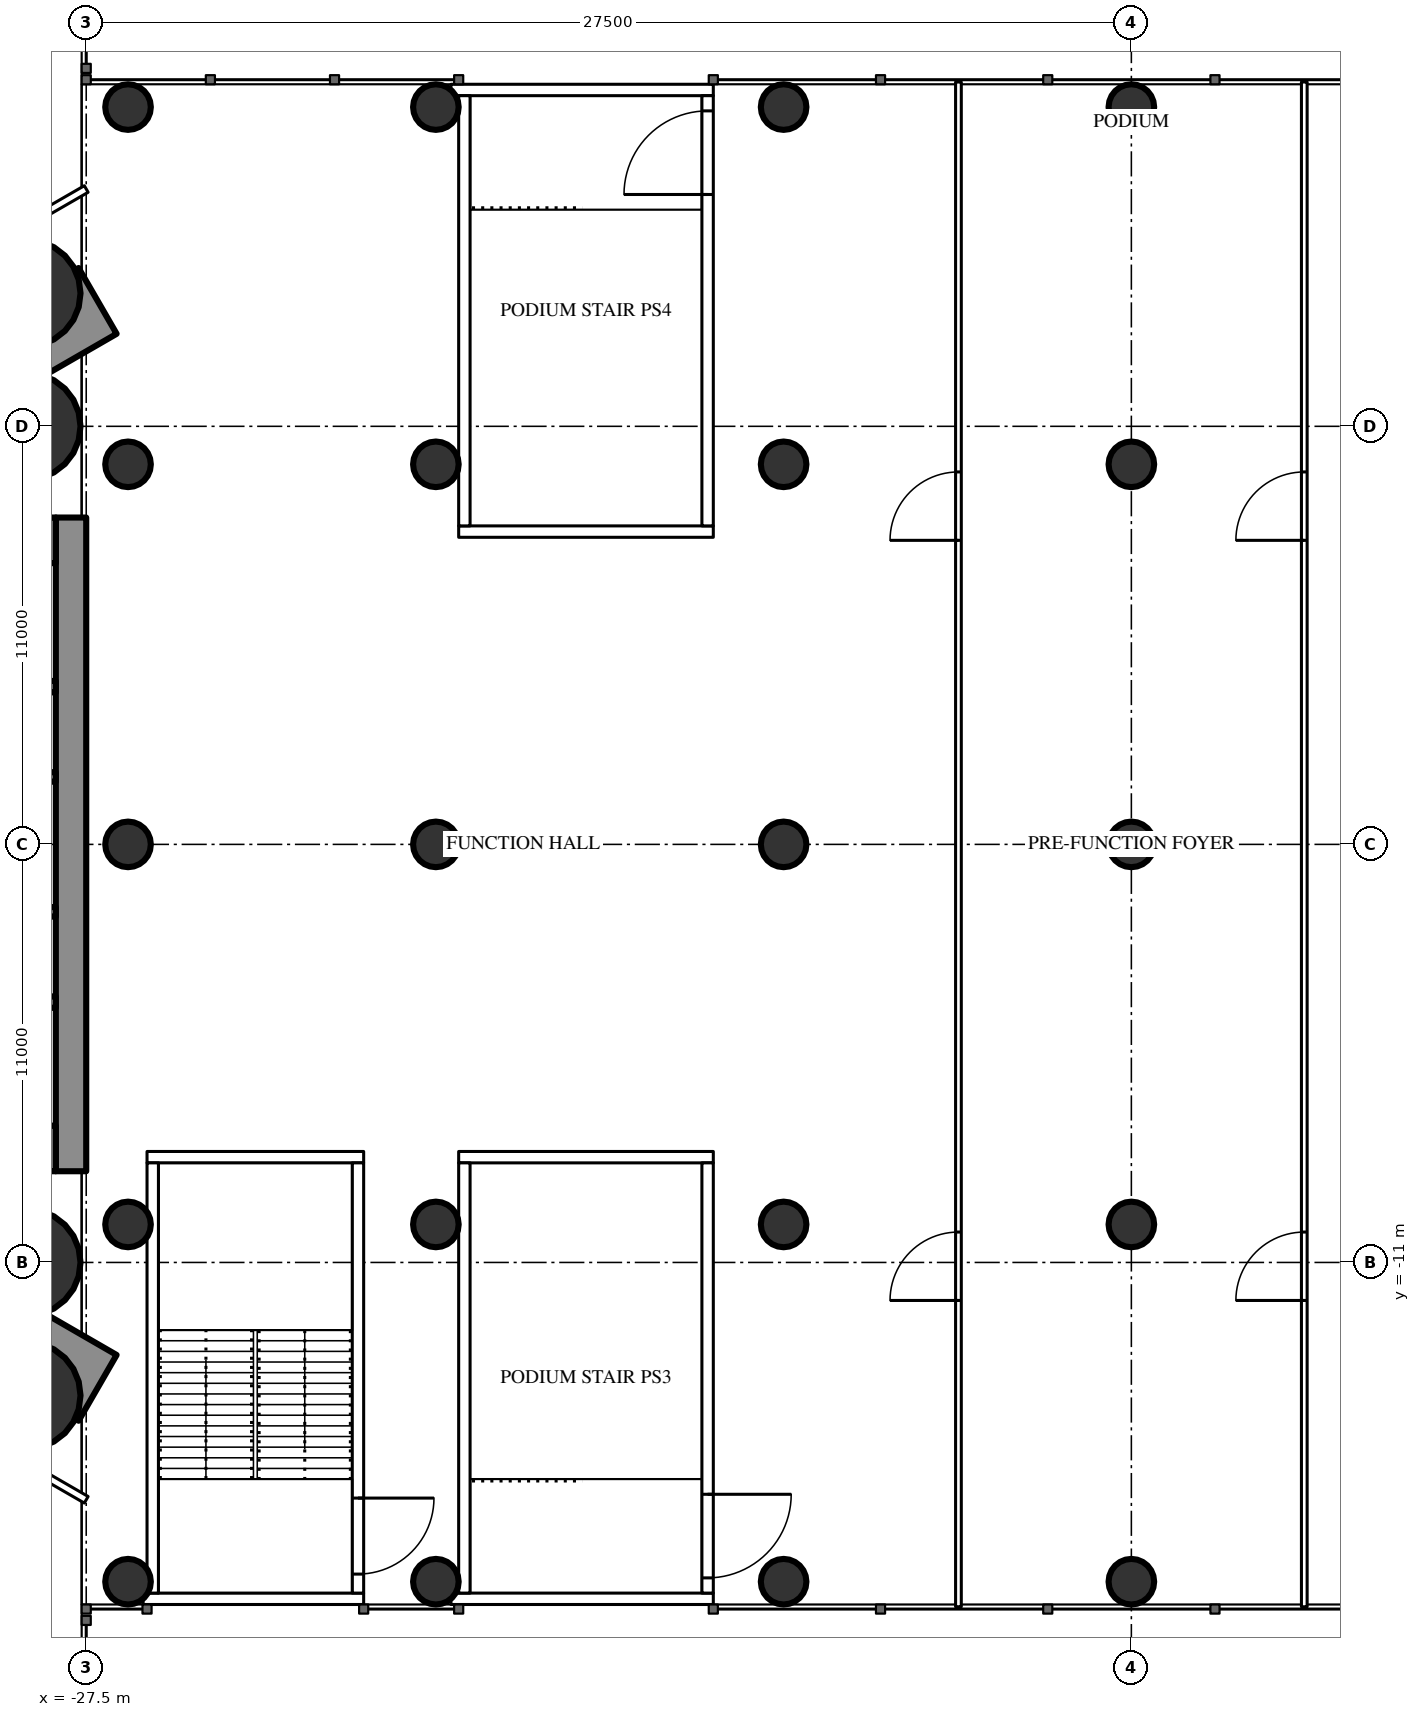
"""IFC4 building model, lengths in metres.
Left out: names, types, materials, properties, quantities, classifications, styles, units other than length and angle.
Written with IfcOpenShell. Run it as: python <this file> out.ifc"""

import sys

from ifc_helpers import new_model, si_unit, direction, frame, frame_2d, origin, origin_2d, place, context, subcontext, project, spatial, rectangle, circle, hollow_circle, extrude, element, fill, save


model = new_model("IFC4")
c1 = context("Model", 3, precision=1e-05, world=origin(), true_north=direction((0.0, 1.0)))
c2 = subcontext(c1, "Body", "Model", "MODEL_VIEW")
j1 = project(units=[si_unit("LENGTHUNIT", "METRE"), si_unit("PLANEANGLEUNIT", "RADIAN")], contexts=[c1])
p1 = place(None, origin())
s1 = spatial("IfcSite", under=j1, at=p1, CompositionType="ELEMENT")
p2 = place(p1, origin())
s2 = spatial("IfcBuilding", under=s1, at=p2, CompositionType="ELEMENT")
p3 = place(p2, frame((0.0, 0.0, 7.2)))
s3 = spatial("IfcBuildingStorey", under=s2, at=p3, CompositionType="ELEMENT", Elevation=7.2)
for number, where, z_axis, x_axis in (
    (1, (-29.05, -11.0, 0.0), (0.0, 0.0, 1.0), (1.0, 0.0, 0.0)),
    (2, (-29.05, 11.0, 0.0), (0.0, 0.0, 1.0), (1.0, 0.0, 0.0)),
    (3, (-29.05, 14.5, 0.0), (0.0, 0.0, 1.0), (1.0, 0.0, 0.0)),
    (4, (-29.05, -14.5, 0.0), (0.0, 0.0, 1.0), (1.0, 0.0, 0.0)),
):
    element("IfcColumn", number, at=place(p3, frame(where, z_axis=z_axis, x_axis=x_axis)), inside=s3, PredefinedType="COLUMN", context=c2, shape_type="SweptSolid", body=[
        extrude(hollow_circle(Radius=1.4, WallThickness=0.12, at=origin_2d()), origin(), (0.0, 0.0, 1.0), 5.4),
    ])
p4 = place(p3, frame((-27.9, 8.6, 0.0), z_axis=(0.0, 0.0, 1.0), x_axis=(0.0, -1.0, 0.0)))
e5 = element("IfcWall", 5, at=p4, inside=s3, PredefinedType="SHEAR", context=c2, shape_type="SweptSolid", body=[
    extrude(rectangle(XDim=17.2, YDim=0.8, at=frame_2d((8.6, 0.0))), origin(), (0.0, 0.0, 1.0), 5.4),
])
p5 = place(p3, frame((-28.3, 8.0, 0.0), z_axis=(0.0, 0.0, 1.0), x_axis=(-1.0, 0.0, 0.0)))
e6 = element("IfcWall", 6, at=p5, inside=s3, PredefinedType="SHEAR", context=c2, shape_type="SweptSolid", body=[
    extrude(rectangle(XDim=8.4, YDim=1.2, at=frame_2d((4.2, 0.0))), origin(), (0.0, 0.0, 1.0), 5.4),
])
p6 = place(p5, frame((0.25, 0.0, 0.0)))
e7 = element("IfcOpeningElement", 7, at=p6, cuts=e6, PredefinedType="OPENING", context=c2, shape_type="SweptSolid", body=[
    extrude(rectangle(XDim=1.0, YDim=2.2, at=frame_2d((0.5, 1.1))), frame((0.0, 0.61, 0.0), z_axis=(0.0, -1.0, 0.0), x_axis=(1.0, 0.0, 0.0)), (0.0, 0.0, 1.0), 1.22),
])
p7 = place(p3, frame((-28.3, -8.0, 0.0), z_axis=(0.0, 0.0, 1.0), x_axis=(-1.0, 0.0, 0.0)))
e8 = element("IfcWall", 8, at=p7, inside=s3, PredefinedType="SHEAR", context=c2, shape_type="SweptSolid", body=[
    extrude(rectangle(XDim=8.4, YDim=1.2, at=frame_2d((4.2, 0.0))), origin(), (0.0, 0.0, 1.0), 5.4),
])
p8 = place(p7, frame((0.25, 0.0, 0.0)))
e9 = element("IfcOpeningElement", 9, at=p8, cuts=e8, PredefinedType="OPENING", context=c2, shape_type="SweptSolid", body=[
    extrude(rectangle(XDim=1.0, YDim=2.2, at=frame_2d((0.5, 1.1))), frame((0.0, 0.61, 0.0), z_axis=(0.0, -1.0, 0.0), x_axis=(1.0, 0.0, 0.0)), (0.0, 0.0, 1.0), 1.22),
])
for number, where, z_axis, x_axis in (
    (10, (-28.3, 4.15, 0.0), (0.0, 0.0, 1.0), (-1.0, 0.0, 0.0)),
    (11, (-28.3, -4.15, 0.0), (0.0, 0.0, 1.0), (-1.0, 0.0, 0.0)),
):
    element("IfcWall", number, at=place(p3, frame(where, z_axis=z_axis, x_axis=x_axis)), inside=s3, PredefinedType="SHEAR", context=c2, shape_type="SweptSolid", body=[
        extrude(rectangle(XDim=8.4, YDim=0.3, at=frame_2d((4.2, 0.0))), origin(), (0.0, 0.0, 1.0), 5.4),
    ])
for number, where, z_axis, x_axis in (
    (12, (-28.3, 1.775, 0.0), (0.0, 0.0, 1.0), (-1.0, 0.0, 0.0)),
    (13, (-28.3, -1.775, 0.0), (0.0, 0.0, 1.0), (-1.0, 0.0, 0.0)),
):
    element("IfcWall", number, at=place(p3, frame(where, z_axis=z_axis, x_axis=x_axis)), inside=s3, PredefinedType="SHEAR", context=c2, shape_type="SweptSolid", body=[
        extrude(rectangle(XDim=2.9, YDim=0.25, at=frame_2d((1.45, 0.0))), origin(), (0.0, 0.0, 1.0), 5.4),
    ])
p9 = place(p3, frame((-27.2, 14.3, 0.0), z_axis=(0.0, 0.0, 1.0), x_axis=(-0.866026593062, -0.499997940104, 0.0)))
e14 = element("IfcWall", 14, at=p9, inside=s3, PredefinedType="SHEAR", context=c2, shape_type="SweptSolid", body=[
    extrude(rectangle(XDim=28.946, YDim=2.0, at=frame_2d((14.473, 0.0))), origin(), (0.0, 0.0, 1.0), 5.4),
])
p10 = place(p9, frame((4.6, 0.0, 0.0)))
e15 = element("IfcOpeningElement", 15, at=p10, cuts=e14, PredefinedType="OPENING", context=c2, shape_type="SweptSolid", body=[
    extrude(rectangle(XDim=1.0, YDim=2.2, at=frame_2d((0.5, 1.1))), frame((0.0, 1.01, 0.0), z_axis=(0.0, -1.0, 0.0), x_axis=(1.0, 0.0, 0.0)), (0.0, 0.0, 1.0), 2.02),
])
p11 = place(p9, frame((13.395, 0.0, 0.0)))
e16 = element("IfcOpeningElement", 16, at=p11, cuts=e14, PredefinedType="OPENING", context=c2, shape_type="SweptSolid", body=[
    extrude(rectangle(XDim=1.8, YDim=2.2, at=frame_2d((0.9, 1.1))), frame((0.0, 1.01, 0.0), z_axis=(0.0, -1.0, 0.0), x_axis=(1.0, 0.0, 0.0)), (0.0, 0.0, 1.0), 2.02),
])
p12 = place(p3, frame((-27.2, -14.3, 0.0), z_axis=(0.0, 0.0, 1.0), x_axis=(-0.866024044937, 0.500002353585, 0.0)))
e17 = element("IfcWall", 17, at=p12, inside=s3, PredefinedType="SHEAR", context=c2, shape_type="SweptSolid", body=[
    extrude(rectangle(XDim=27.533, YDim=2.0, at=frame_2d((13.767, 0.0))), origin(), (0.0, 0.0, 1.0), 5.4),
])
p13 = place(p12, frame((4.6, 0.0, 0.0)))
e18 = element("IfcOpeningElement", 18, at=p13, cuts=e17, PredefinedType="OPENING", context=c2, shape_type="SweptSolid", body=[
    extrude(rectangle(XDim=1.0, YDim=2.2, at=frame_2d((0.5, 1.1))), frame((0.0, 1.01, 0.0), z_axis=(0.0, -1.0, 0.0), x_axis=(1.0, 0.0, 0.0)), (0.0, 0.0, 1.0), 2.02),
])
p14 = place(p12, frame((13.395, 0.0, 0.0)))
e19 = element("IfcOpeningElement", 19, at=p14, cuts=e17, PredefinedType="OPENING", context=c2, shape_type="SweptSolid", body=[
    extrude(rectangle(XDim=1.8, YDim=2.2, at=frame_2d((0.9, 1.1))), frame((0.0, 1.01, 0.0), z_axis=(0.0, -1.0, 0.0), x_axis=(1.0, 0.0, 0.0)), (0.0, 0.0, 1.0), 2.02),
])
for number, where, z_axis, x_axis in (
    (20, (-26.4, -19.4, 0.0), (0.0, 0.0, 1.0), (1.0, 0.0, 0.0)),
    (21, (-26.4, -10.0, 0.0), (0.0, 0.0, 1.0), (1.0, 0.0, 0.0)),
    (22, (-26.4, 0.0, 0.0), (0.0, 0.0, 1.0), (1.0, 0.0, 0.0)),
    (23, (-26.4, 10.0, 0.0), (0.0, 0.0, 1.0), (1.0, 0.0, 0.0)),
    (24, (-26.4, 19.4, 0.0), (0.0, 0.0, 1.0), (1.0, 0.0, 0.0)),
    (25, (-18.3, -19.4, 0.0), (0.0, 0.0, 1.0), (1.0, 0.0, 0.0)),
    (26, (-18.3, -10.0, 0.0), (0.0, 0.0, 1.0), (1.0, 0.0, 0.0)),
    (27, (-18.3, 0.0, 0.0), (0.0, 0.0, 1.0), (1.0, 0.0, 0.0)),
    (28, (-18.3, 10.0, 0.0), (0.0, 0.0, 1.0), (1.0, 0.0, 0.0)),
    (29, (-18.3, 19.4, 0.0), (0.0, 0.0, 1.0), (1.0, 0.0, 0.0)),
    (30, (-9.15, -19.4, 0.0), (0.0, 0.0, 1.0), (1.0, 0.0, 0.0)),
    (31, (-9.15, -10.0, 0.0), (0.0, 0.0, 1.0), (1.0, 0.0, 0.0)),
    (32, (-9.15, 0.0, 0.0), (0.0, 0.0, 1.0), (1.0, 0.0, 0.0)),
    (33, (-9.15, 10.0, 0.0), (0.0, 0.0, 1.0), (1.0, 0.0, 0.0)),
    (34, (-9.15, 19.4, 0.0), (0.0, 0.0, 1.0), (1.0, 0.0, 0.0)),
    (35, (0.0, -19.4, 0.0), (0.0, 0.0, 1.0), (1.0, 0.0, 0.0)),
    (36, (0.0, -10.0, 0.0), (0.0, 0.0, 1.0), (1.0, 0.0, 0.0)),
    (37, (0.0, 0.0, 0.0), (0.0, 0.0, 1.0), (1.0, 0.0, 0.0)),
    (38, (0.0, 10.0, 0.0), (0.0, 0.0, 1.0), (1.0, 0.0, 0.0)),
    (39, (0.0, 19.4, 0.0), (0.0, 0.0, 1.0), (1.0, 0.0, 0.0)),
):
    element("IfcColumn", number, at=place(p3, frame(where, z_axis=z_axis, x_axis=x_axis)), inside=s3, PredefinedType="COLUMN", context=c2, shape_type="SweptSolid", body=[
        extrude(circle(Radius=0.6, at=origin_2d()), origin(), (0.0, 0.0, 1.0), 5.4),
    ])
p15 = place(p3, frame((-27.5, 17.244, 0.0), z_axis=(0.0, 0.0, 1.0), x_axis=(-0.866039316896, -0.499975901009, 0.0)))
e40 = element("IfcWall", 40, at=p15, inside=s3, PredefinedType="PARTITIONING", context=c2, shape_type="SweptSolid", body=[
    extrude(rectangle(XDim=3.169, YDim=0.2, at=frame_2d((1.584, 0.0))), origin(), (0.0, 0.0, 1.0), 5.05),
])
p16 = place(p3, frame((-27.5, -17.244, 0.0), z_axis=(0.0, 0.0, 1.0), x_axis=(-0.866027347857, 0.499996632752, 0.0)))
e41 = element("IfcWall", 41, at=p16, inside=s3, PredefinedType="PARTITIONING", context=c2, shape_type="SweptSolid", body=[
    extrude(rectangle(XDim=6.269, YDim=0.2, at=frame_2d((3.135, 0.0))), origin(), (0.0, 0.0, 1.0), 5.05),
])
p17 = place(p3, frame((-4.55, -20.06, 0.0), z_axis=(0.0, 0.0, 1.0), x_axis=(0.0, 1.0, 0.0)))
e42 = element("IfcWall", 42, at=p17, inside=s3, PredefinedType="PARTITIONING", context=c2, shape_type="SweptSolid", body=[
    extrude(rectangle(XDim=40.12, YDim=0.15, at=frame_2d((20.06, 0.0))), origin(), (0.0, 0.0, 1.0), 4.05),
])
p18 = place(p17, frame((8.06, 0.0, 0.0)))
e43 = element("IfcOpeningElement", 43, at=p18, cuts=e42, PredefinedType="OPENING", context=c2, shape_type="SweptSolid", body=[
    extrude(rectangle(XDim=1.8, YDim=2.2, at=frame_2d((0.9, 1.1))), frame((0.0, 0.085, 0.0), z_axis=(0.0, -1.0, 0.0), x_axis=(1.0, 0.0, 0.0)), (0.0, 0.0, 1.0), 0.17),
])
p19 = place(p17, frame((28.06, 0.0, 0.0)))
e44 = element("IfcOpeningElement", 44, at=p19, cuts=e42, PredefinedType="OPENING", context=c2, shape_type="SweptSolid", body=[
    extrude(rectangle(XDim=1.8, YDim=2.2, at=frame_2d((0.9, 1.1))), frame((0.0, 0.085, 0.0), z_axis=(0.0, -1.0, 0.0), x_axis=(1.0, 0.0, 0.0)), (0.0, 0.0, 1.0), 0.17),
])
p20 = place(p3, frame((4.55, -20.06, 0.0), z_axis=(0.0, 0.0, 1.0), x_axis=(0.0, 1.0, 0.0)))
e45 = element("IfcWall", 45, at=p20, inside=s3, PredefinedType="PARTITIONING", context=c2, shape_type="SweptSolid", body=[
    extrude(rectangle(XDim=40.12, YDim=0.15, at=frame_2d((20.06, 0.0))), origin(), (0.0, 0.0, 1.0), 4.05),
])
p21 = place(p20, frame((8.06, 0.0, 0.0)))
e46 = element("IfcOpeningElement", 46, at=p21, cuts=e45, PredefinedType="OPENING", context=c2, shape_type="SweptSolid", body=[
    extrude(rectangle(XDim=1.8, YDim=2.2, at=frame_2d((0.9, 1.1))), frame((0.0, 0.085, 0.0), z_axis=(0.0, -1.0, 0.0), x_axis=(1.0, 0.0, 0.0)), (0.0, 0.0, 1.0), 0.17),
])
p22 = place(p20, frame((28.06, 0.0, 0.0)))
e47 = element("IfcOpeningElement", 47, at=p22, cuts=e45, PredefinedType="OPENING", context=c2, shape_type="SweptSolid", body=[
    extrude(rectangle(XDim=1.8, YDim=2.2, at=frame_2d((0.9, 1.1))), frame((0.0, 0.085, 0.0), z_axis=(0.0, -1.0, 0.0), x_axis=(1.0, 0.0, 0.0)), (0.0, 0.0, 1.0), 0.17),
])
p23 = place(p3, frame((-11.0, -19.85, 0.0), z_axis=(0.0, 0.0, 1.0), x_axis=(-1.0, 0.0, 0.0)))
e48 = element("IfcWall", 48, at=p23, inside=s3, PredefinedType="SOLIDWALL", context=c2, shape_type="SweptSolid", body=[
    extrude(rectangle(XDim=6.903, YDim=0.3, at=frame_2d((3.452, 0.0))), origin(), (0.0, 0.0, 1.0), 5.05),
])
p24 = place(p3, frame((-17.7, -8.23, 0.0), z_axis=(0.0, 0.0, 1.0), x_axis=(1.0, 0.0, 0.0)))
e49 = element("IfcWall", 49, at=p24, inside=s3, PredefinedType="SOLIDWALL", context=c2, shape_type="SweptSolid", body=[
    extrude(rectangle(XDim=6.7, YDim=0.3, at=frame_2d((3.35, 0.0))), origin(), (0.0, 0.0, 1.0), 5.05),
])
p25 = place(p3, frame((-11.15, -8.38, 0.0), z_axis=(0.0, 0.0, 1.0), x_axis=(0.0, -1.0, 0.0)))
e50 = element("IfcWall", 50, at=p25, inside=s3, PredefinedType="SOLIDWALL", context=c2, shape_type="SweptSolid", body=[
    extrude(rectangle(XDim=11.32, YDim=0.3, at=frame_2d((5.66, 0.0))), origin(), (0.0, 0.0, 1.0), 5.05),
])
p26 = place(p25, frame((8.72, 0.0, 0.0)))
e51 = element("IfcOpeningElement", 51, at=p26, cuts=e50, PredefinedType="OPENING", context=c2, shape_type="SweptSolid", body=[
    extrude(rectangle(XDim=2.2, YDim=2.2, at=frame_2d((1.1, 1.1))), frame((0.0, 0.16, 0.0), z_axis=(0.0, -1.0, 0.0), x_axis=(1.0, 0.0, 0.0)), (0.0, 0.0, 1.0), 0.32),
])
p27 = place(p3, frame((-17.55, -8.38, 0.0), z_axis=(0.0, 0.0, 1.0), x_axis=(0.0, -1.0, 0.0)))
e52 = element("IfcWall", 52, at=p27, inside=s3, PredefinedType="SOLIDWALL", context=c2, shape_type="SweptSolid", body=[
    extrude(rectangle(XDim=11.32, YDim=0.3, at=frame_2d((5.66, 0.0))), origin(), (0.0, 0.0, 1.0), 5.05),
])
p28 = place(p3, frame((-17.903, 19.85, 0.0), z_axis=(0.0, 0.0, 1.0), x_axis=(1.0, 0.0, 0.0)))
e53 = element("IfcWall", 53, at=p28, inside=s3, PredefinedType="SOLIDWALL", context=c2, shape_type="SweptSolid", body=[
    extrude(rectangle(XDim=6.903, YDim=0.3, at=frame_2d((3.452, 0.0))), origin(), (0.0, 0.0, 1.0), 5.05),
])
p29 = place(p3, frame((-17.7, 8.23, 0.0), z_axis=(0.0, 0.0, 1.0), x_axis=(1.0, 0.0, 0.0)))
e54 = element("IfcWall", 54, at=p29, inside=s3, PredefinedType="SOLIDWALL", context=c2, shape_type="SweptSolid", body=[
    extrude(rectangle(XDim=6.7, YDim=0.3, at=frame_2d((3.35, 0.0))), origin(), (0.0, 0.0, 1.0), 5.05),
])
p30 = place(p3, frame((-11.15, 8.38, 0.0), z_axis=(0.0, 0.0, 1.0), x_axis=(0.0, 1.0, 0.0)))
e55 = element("IfcWall", 55, at=p30, inside=s3, PredefinedType="SOLIDWALL", context=c2, shape_type="SweptSolid", body=[
    extrude(rectangle(XDim=11.32, YDim=0.3, at=frame_2d((5.66, 0.0))), origin(), (0.0, 0.0, 1.0), 5.05),
])
p31 = place(p30, frame((8.72, 0.0, 0.0)))
e56 = element("IfcOpeningElement", 56, at=p31, cuts=e55, PredefinedType="OPENING", context=c2, shape_type="SweptSolid", body=[
    extrude(rectangle(XDim=2.2, YDim=2.2, at=frame_2d((1.1, 1.1))), frame((0.0, 0.16, 0.0), z_axis=(0.0, -1.0, 0.0), x_axis=(1.0, 0.0, 0.0)), (0.0, 0.0, 1.0), 0.32),
])
p32 = place(p3, frame((-17.55, 8.38, 0.0), z_axis=(0.0, 0.0, 1.0), x_axis=(0.0, 1.0, 0.0)))
e57 = element("IfcWall", 57, at=p32, inside=s3, PredefinedType="SOLIDWALL", context=c2, shape_type="SweptSolid", body=[
    extrude(rectangle(XDim=11.32, YDim=0.3, at=frame_2d((5.66, 0.0))), origin(), (0.0, 0.0, 1.0), 5.05),
])
p33 = place(p3, frame((-20.2, -19.85, 0.0), z_axis=(0.0, 0.0, 1.0), x_axis=(-1.0, 0.0, 0.0)))
e58 = element("IfcWall", 58, at=p33, inside=s3, PredefinedType="SOLIDWALL", context=c2, shape_type="SweptSolid", body=[
    extrude(rectangle(XDim=5.803, YDim=0.3, at=frame_2d((2.902, 0.0))), origin(), (0.0, 0.0, 1.0), 3.55),
])
p34 = place(p3, frame((-25.9, -8.23, 0.0), z_axis=(0.0, 0.0, 1.0), x_axis=(1.0, 0.0, 0.0)))
e59 = element("IfcWall", 59, at=p34, inside=s3, PredefinedType="SOLIDWALL", context=c2, shape_type="SweptSolid", body=[
    extrude(rectangle(XDim=5.7, YDim=0.3, at=frame_2d((2.85, 0.0))), origin(), (0.0, 0.0, 1.0), 5.05),
])
p35 = place(p3, frame((-20.35, -8.38, 0.0), z_axis=(0.0, 0.0, 1.0), x_axis=(0.0, -1.0, 0.0)))
e60 = element("IfcWall", 60, at=p35, inside=s3, PredefinedType="SOLIDWALL", context=c2, shape_type="SweptSolid", body=[
    extrude(rectangle(XDim=11.32, YDim=0.3, at=frame_2d((5.66, 0.0))), origin(), (0.0, 0.0, 1.0), 5.05),
])
p36 = place(p35, frame((8.82, 0.0, 0.0)))
e61 = element("IfcOpeningElement", 61, at=p36, cuts=e60, PredefinedType="OPENING", context=c2, shape_type="SweptSolid", body=[
    extrude(rectangle(XDim=2.0, YDim=2.2, at=frame_2d((1.0, 1.1))), frame((0.0, 0.16, 0.0), z_axis=(0.0, -1.0, 0.0), x_axis=(1.0, 0.0, 0.0)), (0.0, 0.0, 1.0), 0.32),
])
p37 = place(p3, frame((-25.75, -8.38, 0.0), z_axis=(0.0, 0.0, 1.0), x_axis=(0.0, -1.0, 0.0)))
e62 = element("IfcWall", 62, at=p37, inside=s3, PredefinedType="SOLIDWALL", context=c2, shape_type="SweptSolid", body=[
    extrude(rectangle(XDim=11.32, YDim=0.3, at=frame_2d((5.66, 0.0))), origin(), (0.0, 0.0, 1.0), 5.05),
])
p38 = place(p18, origin())
e63 = element("IfcDoor", 63, at=p38, inside=s3, OperationType="DOUBLE_DOOR_SINGLE_SWING", PredefinedType="DOOR", context=c2, shape_type="SweptSolid", body=[
    extrude(rectangle(XDim=1.8, YDim=2.2, at=frame_2d((0.9, 1.1))), frame((0.0, 0.025, 0.0), z_axis=(0.0, -1.0, 0.0), x_axis=(1.0, 0.0, 0.0)), (0.0, 0.0, 1.0), 0.05),
])
fill(e43, e63)
p39 = place(p19, origin())
e64 = element("IfcDoor", 64, at=p39, inside=s3, OperationType="DOUBLE_DOOR_SINGLE_SWING", PredefinedType="DOOR", context=c2, shape_type="SweptSolid", body=[
    extrude(rectangle(XDim=1.8, YDim=2.2, at=frame_2d((0.9, 1.1))), frame((0.0, 0.025, 0.0), z_axis=(0.0, -1.0, 0.0), x_axis=(1.0, 0.0, 0.0)), (0.0, 0.0, 1.0), 0.05),
])
fill(e44, e64)
p40 = place(p21, origin())
e65 = element("IfcDoor", 65, at=p40, inside=s3, OperationType="DOUBLE_DOOR_SINGLE_SWING", PredefinedType="DOOR", context=c2, shape_type="SweptSolid", body=[
    extrude(rectangle(XDim=1.8, YDim=2.2, at=frame_2d((0.9, 1.1))), frame((0.0, 0.025, 0.0), z_axis=(0.0, -1.0, 0.0), x_axis=(1.0, 0.0, 0.0)), (0.0, 0.0, 1.0), 0.05),
])
fill(e46, e65)
p41 = place(p22, origin())
e66 = element("IfcDoor", 66, at=p41, inside=s3, OperationType="DOUBLE_DOOR_SINGLE_SWING", PredefinedType="DOOR", context=c2, shape_type="SweptSolid", body=[
    extrude(rectangle(XDim=1.8, YDim=2.2, at=frame_2d((0.9, 1.1))), frame((0.0, 0.025, 0.0), z_axis=(0.0, -1.0, 0.0), x_axis=(1.0, 0.0, 0.0)), (0.0, 0.0, 1.0), 0.05),
])
fill(e47, e66)
p42 = place(p26, origin())
e67 = element("IfcDoor", 67, at=p42, inside=s3, OperationType="DOUBLE_DOOR_SINGLE_SWING", PredefinedType="DOOR", context=c2, shape_type="SweptSolid", body=[
    extrude(rectangle(XDim=2.2, YDim=2.2, at=frame_2d((1.1, 1.1))), frame((0.0, 0.025, 0.0), z_axis=(0.0, -1.0, 0.0), x_axis=(1.0, 0.0, 0.0)), (0.0, 0.0, 1.0), 0.05),
])
fill(e51, e67)
p43 = place(p31, origin())
e68 = element("IfcDoor", 68, at=p43, inside=s3, OperationType="DOUBLE_DOOR_SINGLE_SWING", PredefinedType="DOOR", context=c2, shape_type="SweptSolid", body=[
    extrude(rectangle(XDim=2.2, YDim=2.2, at=frame_2d((1.1, 1.1))), frame((0.0, 0.025, 0.0), z_axis=(0.0, -1.0, 0.0), x_axis=(1.0, 0.0, 0.0)), (0.0, 0.0, 1.0), 0.05),
])
fill(e56, e68)
p44 = place(p36, origin())
e69 = element("IfcDoor", 69, at=p44, inside=s3, OperationType="DOUBLE_DOOR_SINGLE_SWING", PredefinedType="DOOR", context=c2, shape_type="SweptSolid", body=[
    extrude(rectangle(XDim=2.0, YDim=2.2, at=frame_2d((1.0, 1.1))), frame((0.0, 0.025, 0.0), z_axis=(0.0, -1.0, 0.0), x_axis=(1.0, 0.0, 0.0)), (0.0, 0.0, 1.0), 0.05),
])
fill(e61, e69)
save(model, sys.argv[1])
